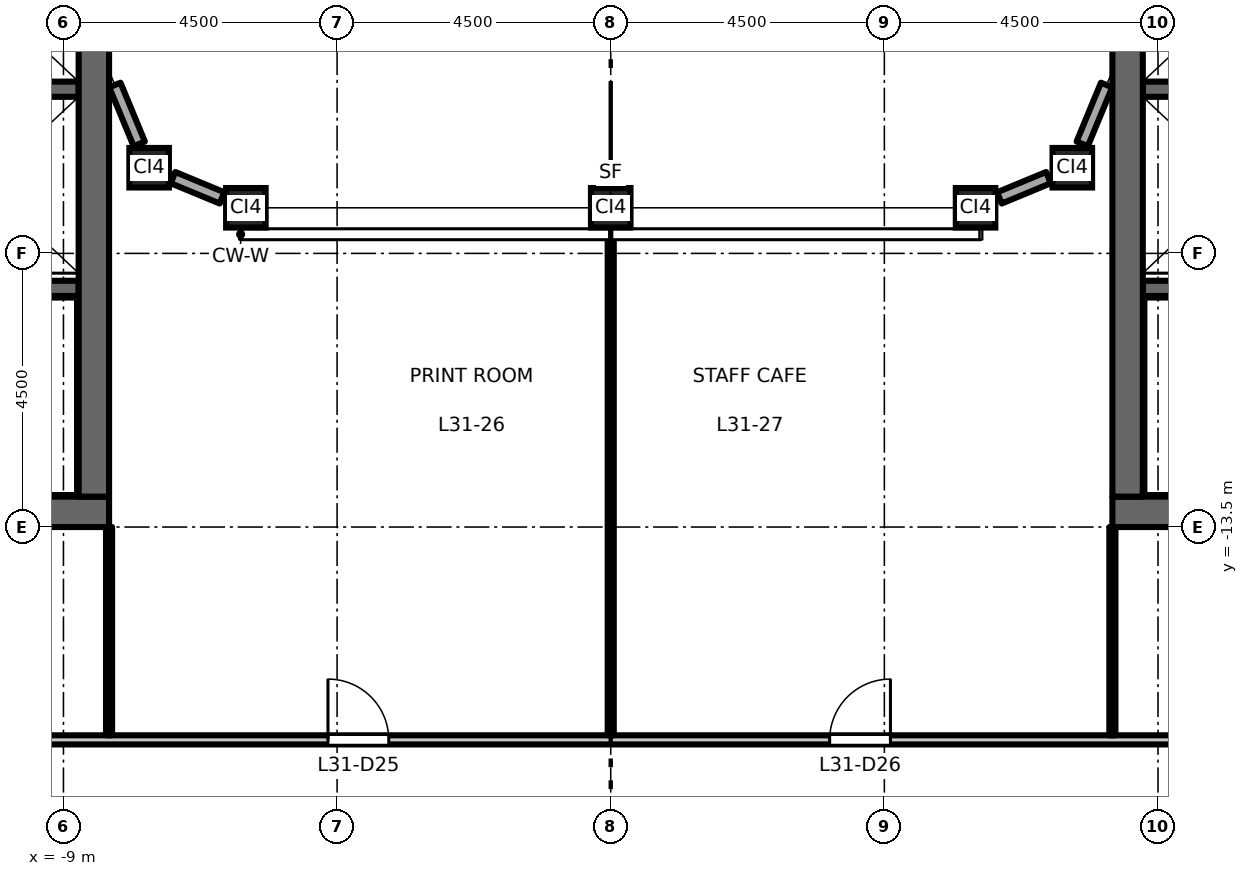
"""IFC4 building model, lengths in metres.
Left out: names, types, materials, properties, quantities, classifications, styles, units other than length and angle.
Written with IfcOpenShell. Run it as: python <this file> out.ifc"""

import sys

from ifc_helpers import new_model, si_unit, direction, frame, frame_2d, origin, origin_2d, place, context, subcontext, project, spatial, rectangle, hollow_rectangle, extrude, element, fill, save


model = new_model("IFC4")
c1 = context("Model", 3, precision=1e-05, world=origin(), true_north=direction((0.0, 1.0)))
c2 = subcontext(c1, "Body", "Model", "MODEL_VIEW")
j1 = project(units=[si_unit("LENGTHUNIT", "METRE"), si_unit("PLANEANGLEUNIT", "RADIAN")], contexts=[c1])
p1 = place(None, origin())
s1 = spatial("IfcSite", under=j1, at=p1, CompositionType="ELEMENT")
p2 = place(p1, origin())
s2 = spatial("IfcBuilding", under=s1, at=p2, CompositionType="ELEMENT")
p3 = place(p2, frame((0.0, 0.0, 145.2)))
s3 = spatial("IfcBuildingStorey", under=s2, at=p3, CompositionType="ELEMENT", Elevation=145.2)
for number, where, z_axis, x_axis in (
    (1, (-7.591, -7.591, 0.0), (0.0, 0.0, 1.0), (1.0, 0.0, 0.0)),
    (2, (-6.0, -8.25, 0.0), (0.0, 0.0, 1.0), (1.0, 0.0, 0.0)),
    (3, (0.0, -8.25, 0.0), (0.0, 0.0, 1.0), (1.0, 0.0, 0.0)),
    (4, (6.0, -8.25, 0.0), (0.0, 0.0, 1.0), (1.0, 0.0, 0.0)),
    (5, (7.591, -7.591, 0.0), (0.0, 0.0, 1.0), (1.0, 0.0, 0.0)),
):
    element("IfcColumn", number, at=place(p3, frame(where, z_axis=z_axis, x_axis=x_axis)), inside=s3, PredefinedType="COLUMN", context=c2, shape_type="SweptSolid", body=[
        extrude(hollow_rectangle(XDim=0.65, YDim=0.65, WallThickness=0.036, at=origin_2d()), origin(), (0.0, 0.0, 1.0), 4.5),
    ])
p4 = place(p3, frame((-8.75, -6.3, 0.0), z_axis=(0.0, 0.0, 1.0), x_axis=(-1.0, 0.0, 0.0)))
e6 = element("IfcWall", 6, at=p4, inside=s3, PredefinedType="SHEAR", context=c2, shape_type="SweptSolid", body=[
    extrude(rectangle(XDim=3.1, YDim=0.25, at=frame_2d((1.55, 0.0))), origin(), (0.0, 0.0, 1.0), 4.35),
])
p5 = place(p3, frame((-8.75, -9.575, 0.0), z_axis=(0.0, 0.0, 1.0), x_axis=(-1.0, 0.0, 0.0)))
e7 = element("IfcWall", 7, at=p5, inside=s3, PredefinedType="SHEAR", context=c2, shape_type="SweptSolid", body=[
    extrude(rectangle(XDim=8.0, YDim=0.25, at=frame_2d((4.0, 0.0))), origin(), (0.0, 0.0, 1.0), 4.35),
])
p6 = place(p5, frame((6.65, 0.0, 0.0)))
e8 = element("IfcOpeningElement", 8, at=p6, cuts=e7, PredefinedType="OPENING", context=c2, shape_type="SweptSolid", body=[
    extrude(rectangle(XDim=1.1, YDim=2.1, at=frame_2d((0.55, 1.05))), frame((0.0, 0.135, 0.0), z_axis=(0.0, -1.0, 0.0), x_axis=(1.0, 0.0, 0.0)), (0.0, 0.0, 1.0), 0.27),
])
p7 = place(p3, frame((-8.25, -13.25, 0.0), z_axis=(0.0, 0.0, 1.0), x_axis=(-1.0, 0.0, 0.0)))
e9 = element("IfcWall", 9, at=p7, inside=s3, PredefinedType="SHEAR", context=c2, shape_type="SweptSolid", body=[
    extrude(rectangle(XDim=13.5, YDim=0.5, at=frame_2d((6.75, 0.0))), origin(), (0.0, 0.0, 1.0), 4.35),
])
p8 = place(p3, frame((-8.5, -13.0, 0.0), z_axis=(0.0, 0.0, 1.0), x_axis=(0.0, 1.0, 0.0)))
e10 = element("IfcWall", 10, at=p8, inside=s3, PredefinedType="SHEAR", context=c2, shape_type="SweptSolid", body=[
    extrude(rectangle(XDim=26.0, YDim=0.5, at=frame_2d((13.0, 0.0))), origin(), (0.0, 0.0, 1.0), 4.35),
])
p9 = place(p3, frame((8.75, -6.3, 0.0), z_axis=(0.0, 0.0, 1.0), x_axis=(1.0, 0.0, 0.0)))
e11 = element("IfcWall", 11, at=p9, inside=s3, PredefinedType="SHEAR", context=c2, shape_type="SweptSolid", body=[
    extrude(rectangle(XDim=3.1, YDim=0.25, at=frame_2d((1.55, 0.0))), origin(), (0.0, 0.0, 1.0), 4.35),
])
p10 = place(p3, frame((8.75, -9.575, 0.0), z_axis=(0.0, 0.0, 1.0), x_axis=(1.0, 0.0, 0.0)))
e12 = element("IfcWall", 12, at=p10, inside=s3, PredefinedType="SHEAR", context=c2, shape_type="SweptSolid", body=[
    extrude(rectangle(XDim=8.0, YDim=0.25, at=frame_2d((4.0, 0.0))), origin(), (0.0, 0.0, 1.0), 4.35),
])
p11 = place(p10, frame((6.65, 0.0, 0.0)))
e13 = element("IfcOpeningElement", 13, at=p11, cuts=e12, PredefinedType="OPENING", context=c2, shape_type="SweptSolid", body=[
    extrude(rectangle(XDim=1.1, YDim=2.1, at=frame_2d((0.55, 1.05))), frame((0.0, 0.135, 0.0), z_axis=(0.0, -1.0, 0.0), x_axis=(1.0, 0.0, 0.0)), (0.0, 0.0, 1.0), 0.27),
])
p12 = place(p3, frame((8.25, -13.25, 0.0), z_axis=(0.0, 0.0, 1.0), x_axis=(1.0, 0.0, 0.0)))
e14 = element("IfcWall", 14, at=p12, inside=s3, PredefinedType="SHEAR", context=c2, shape_type="SweptSolid", body=[
    extrude(rectangle(XDim=13.5, YDim=0.5, at=frame_2d((6.75, 0.0))), origin(), (0.0, 0.0, 1.0), 4.35),
])
p13 = place(p3, frame((8.5, -13.0, 0.0), z_axis=(0.0, 0.0, 1.0), x_axis=(0.0, 1.0, 0.0)))
e15 = element("IfcWall", 15, at=p13, inside=s3, PredefinedType="SHEAR", context=c2, shape_type="SweptSolid", body=[
    extrude(rectangle(XDim=26.0, YDim=0.5, at=frame_2d((13.0, 0.0))), origin(), (0.0, 0.0, 1.0), 4.35),
])
p14 = place(p3, frame((6.392, -8.087, 0.0), z_axis=(0.0, 0.0, 1.0), x_axis=(0.923894108428, 0.382648241093, 0.0)))
e16 = element("IfcWall", 16, at=p14, inside=s3, PredefinedType="STANDARD", context=c2, shape_type="SweptSolid", body=[
    extrude(rectangle(XDim=0.873, YDim=0.2, at=frame_2d((0.437, 0.0))), origin(), (0.0, 0.0, 1.0), 3.826),
])
for number, where, z_axis, x_axis in (
    (17, (7.753, -7.199, 0.0), (0.0, 0.0, 1.0), (0.383, 0.924, 0.0)),
    (18, (-8.154, -6.231, 0.0), (0.0, 0.0, 1.0), (0.383, -0.924, 0.0)),
):
    element("IfcWall", number, at=place(p3, frame(where, z_axis=z_axis, x_axis=x_axis)), inside=s3, PredefinedType="STANDARD", context=c2, shape_type="SweptSolid", body=[
        extrude(rectangle(XDim=1.048, YDim=0.2, at=frame_2d((0.524, 0.0))), origin(), (0.0, 0.0, 1.0), 3.826),
    ])
p15 = place(p3, frame((-7.199, -7.753, 0.0), z_axis=(0.0, 0.0, 1.0), x_axis=(0.923894108428, -0.382648241093, 0.0)))
e19 = element("IfcWall", 19, at=p15, inside=s3, PredefinedType="STANDARD", context=c2, shape_type="SweptSolid", body=[
    extrude(rectangle(XDim=0.873, YDim=0.2, at=frame_2d((0.437, 0.0))), origin(), (0.0, 0.0, 1.0), 3.826),
])
p16 = place(p3, frame((-21.825, -17.0, 0.0), z_axis=(0.0, 0.0, 1.0), x_axis=(1.0, 0.0, 0.0)))
e20 = element("IfcWall", 20, at=p16, inside=s3, PredefinedType="PARTITIONING", context=c2, shape_type="SweptSolid", body=[
    extrude(rectangle(XDim=43.65, YDim=0.15, at=frame_2d((21.825, 0.0))), origin(), (0.0, 0.0, 1.0), 4.35),
])
p17 = place(p16, frame((17.175, 0.0, 0.0)))
e21 = element("IfcOpeningElement", 21, at=p17, cuts=e20, PredefinedType="OPENING", context=c2, shape_type="SweptSolid", body=[
    extrude(rectangle(XDim=1.0, YDim=2.1, at=frame_2d((0.5, 1.05))), frame((0.0, 0.085, 0.0), z_axis=(0.0, -1.0, 0.0), x_axis=(1.0, 0.0, 0.0)), (0.0, 0.0, 1.0), 0.17),
])
p18 = place(p16, frame((25.425, 0.0, 0.0)))
e22 = element("IfcOpeningElement", 22, at=p18, cuts=e20, PredefinedType="OPENING", context=c2, shape_type="SweptSolid", body=[
    extrude(rectangle(XDim=1.0, YDim=2.1, at=frame_2d((0.5, 1.05))), frame((0.0, 0.085, 0.0), z_axis=(0.0, -1.0, 0.0), x_axis=(1.0, 0.0, 0.0)), (0.0, 0.0, 1.0), 0.17),
])
p19 = place(p16, frame((6.425, 0.0, 0.0)))
e23 = element("IfcOpeningElement", 23, at=p19, cuts=e20, PredefinedType="OPENING", context=c2, shape_type="SweptSolid", body=[
    extrude(rectangle(XDim=1.0, YDim=2.1, at=frame_2d((0.5, 1.05))), frame((0.0, 0.085, 0.0), z_axis=(0.0, -1.0, 0.0), x_axis=(1.0, 0.0, 0.0)), (0.0, 0.0, 1.0), 0.17),
])
p20 = place(p16, frame((36.425, 0.0, 0.0)))
e24 = element("IfcOpeningElement", 24, at=p20, cuts=e20, PredefinedType="OPENING", context=c2, shape_type="SweptSolid", body=[
    extrude(rectangle(XDim=1.0, YDim=2.1, at=frame_2d((0.5, 1.05))), frame((0.0, 0.085, 0.0), z_axis=(0.0, -1.0, 0.0), x_axis=(1.0, 0.0, 0.0)), (0.0, 0.0, 1.0), 0.17),
])
p21 = place(p3, frame((-8.25, -16.925, 0.0), z_axis=(0.0, 0.0, 1.0), x_axis=(0.0, 1.0, 0.0)))
e25 = element("IfcWall", 25, at=p21, inside=s3, PredefinedType="PARTITIONING", context=c2, shape_type="SweptSolid", body=[
    extrude(rectangle(XDim=3.425, YDim=0.1, at=frame_2d((1.712, 0.0))), origin(), (0.0, 0.0, 1.0), 4.35),
])
p22 = place(p3, frame((0.0, -16.925, 0.0), z_axis=(0.0, 0.0, 1.0), x_axis=(0.0, 1.0, 0.0)))
e26 = element("IfcWall", 26, at=p22, inside=s3, PredefinedType="PARTITIONING", context=c2, shape_type="SweptSolid", body=[
    extrude(rectangle(XDim=8.275, YDim=0.1, at=frame_2d((4.138, 0.0))), origin(), (0.0, 0.0, 1.0), 3.45),
])
p23 = place(p3, frame((8.25, -16.925, 0.0), z_axis=(0.0, 0.0, 1.0), x_axis=(0.0, 1.0, 0.0)))
e27 = element("IfcWall", 27, at=p23, inside=s3, PredefinedType="PARTITIONING", context=c2, shape_type="SweptSolid", body=[
    extrude(rectangle(XDim=3.425, YDim=0.1, at=frame_2d((1.712, 0.0))), origin(), (0.0, 0.0, 1.0), 4.35),
])
p24 = place(p17, origin())
e28 = element("IfcDoor", 28, at=p24, inside=s3, OperationType="SINGLE_SWING_LEFT", PredefinedType="DOOR", context=c2, shape_type="SweptSolid", body=[
    extrude(rectangle(XDim=1.0, YDim=2.1, at=frame_2d((0.5, 1.05))), frame((0.0, 0.025, 0.0), z_axis=(0.0, -1.0, 0.0), x_axis=(1.0, 0.0, 0.0)), (0.0, 0.0, 1.0), 0.05),
])
fill(e21, e28)
p25 = place(p18, origin())
e29 = element("IfcDoor", 29, at=p25, inside=s3, OperationType="SINGLE_SWING_RIGHT", PredefinedType="DOOR", context=c2, shape_type="SweptSolid", body=[
    extrude(rectangle(XDim=1.0, YDim=2.1, at=frame_2d((0.5, 1.05))), frame((0.0, 0.025, 0.0), z_axis=(0.0, -1.0, 0.0), x_axis=(1.0, 0.0, 0.0)), (0.0, 0.0, 1.0), 0.05),
])
fill(e22, e29)
save(model, sys.argv[1])
